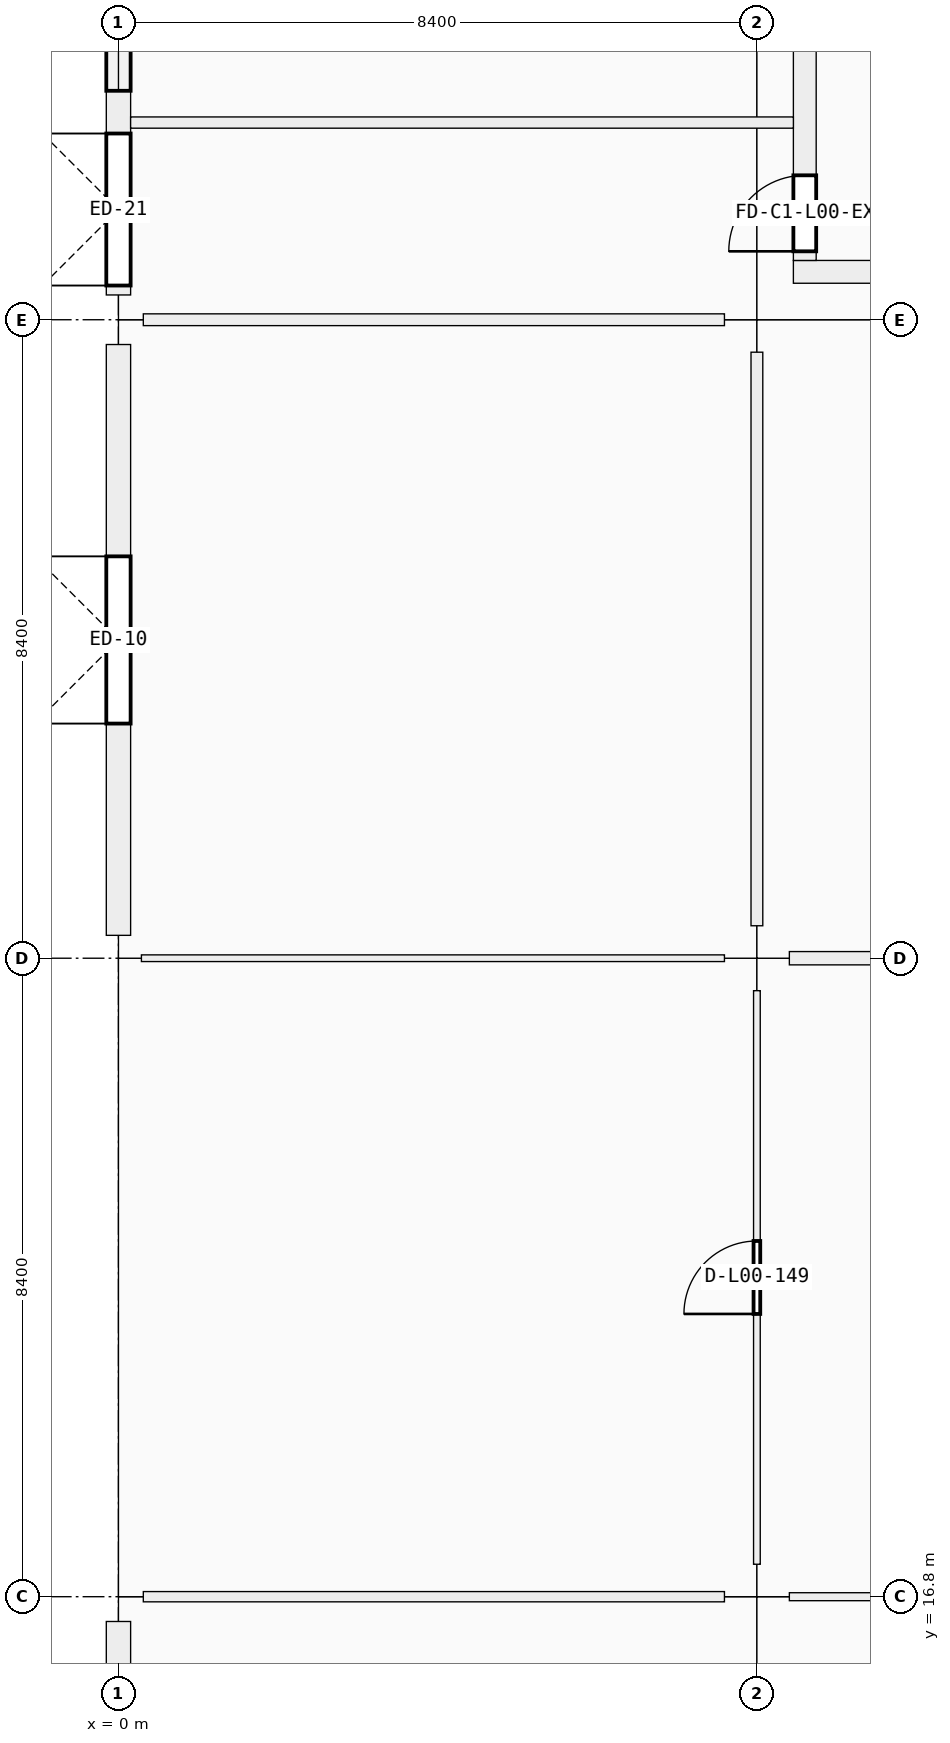
"""IFC4 building model, lengths in metres.
Left out: names, types, materials, properties, quantities, classifications, styles, units other than length and angle.
Written with IfcOpenShell. Run it as: python <this file> out.ifc"""

import sys

from ifc_helpers import new_model, si_unit, direction, frame, frame_2d, origin, origin_2d, place, context, subcontext, project, spatial, rectangle, extrude, element, fill, save


model = new_model("IFC4")
c1 = context("Model", 3, precision=1e-05, world=origin(), true_north=direction((0.0, 1.0)))
c2 = subcontext(c1, "Body", "Model", "MODEL_VIEW")
j1 = project(units=[si_unit("LENGTHUNIT", "METRE"), si_unit("PLANEANGLEUNIT", "RADIAN")], contexts=[c1])
p1 = place(None, origin())
s1 = spatial("IfcSite", under=j1, at=p1, CompositionType="ELEMENT")
p2 = place(p1, origin())
s2 = spatial("IfcBuilding", under=s1, at=p2, CompositionType="ELEMENT")
p3 = place(p2, origin())
s3 = spatial("IfcBuildingStorey", under=s2, at=p3, CompositionType="ELEMENT", Elevation=0.0)
p4 = place(p3, frame((0.0, 16.8, 0.0), z_axis=(0.0, 0.0, 1.0), x_axis=(1.0, 0.0, 0.0)))
e1 = element("IfcColumn", 1, at=p4, inside=s3, PredefinedType="COLUMN", context=c2, shape_type="SweptSolid", body=[
    extrude(rectangle(XDim=0.65, YDim=0.65, at=origin_2d()), origin(), (0.0, 0.0, 1.0), 5.76),
])
p5 = place(p3, frame((0.0, 25.2, 0.0), z_axis=(0.0, 0.0, 1.0), x_axis=(1.0, 0.0, 0.0)))
e2 = element("IfcColumn", 2, at=p5, inside=s3, PredefinedType="COLUMN", context=c2, shape_type="SweptSolid", body=[
    extrude(rectangle(XDim=0.6, YDim=0.6, at=origin_2d()), origin(), (0.0, 0.0, 1.0), 5.76),
])
p6 = place(p3, frame((0.0, 33.6, 0.0), z_axis=(0.0, 0.0, 1.0), x_axis=(1.0, 0.0, 0.0)))
e3 = element("IfcColumn", 3, at=p6, inside=s3, PredefinedType="COLUMN", context=c2, shape_type="SweptSolid", body=[
    extrude(rectangle(XDim=0.65, YDim=0.65, at=origin_2d()), origin(), (0.0, 0.0, 1.0), 5.76),
])
for number, where, z_axis, x_axis in (
    (4, (8.4, 16.8, 0.0), (0.0, 0.0, 1.0), (1.0, 0.0, 0.0)),
    (5, (8.4, 25.2, 0.0), (0.0, 0.0, 1.0), (1.0, 0.0, 0.0)),
    (6, (8.4, 33.6, 0.0), (0.0, 0.0, 1.0), (1.0, 0.0, 0.0)),
):
    element("IfcColumn", number, at=place(p3, frame(where, z_axis=z_axis, x_axis=x_axis)), inside=s3, PredefinedType="COLUMN", context=c2, shape_type="SweptSolid", body=[
        extrude(rectangle(XDim=0.85, YDim=0.85, at=origin_2d()), origin(), (0.0, 0.0, 1.0), 5.76),
    ])
p7 = place(p3, frame((0.0, 8.701, 0.0), z_axis=(0.0, 0.0, 1.0), x_axis=(0.0, 1.0, 0.0)))
e7 = element("IfcWall", 7, at=p7, inside=s3, PredefinedType="SOLIDWALL", context=c2, shape_type="SweptSolid", body=[
    extrude(rectangle(XDim=7.773, YDim=0.32, at=frame_2d((3.887, 0.0))), origin(), (0.0, 0.0, 1.0), 4.7),
])
p8 = place(p7, frame((2.837, 0.0, 0.9)))
e8 = element("IfcOpeningElement", 8, at=p8, cuts=e7, PredefinedType="OPENING", context=c2, shape_type="SweptSolid", body=[
    extrude(rectangle(XDim=2.1, YDim=1.8, at=frame_2d((1.05, 0.9))), frame((0.0, 0.16, 0.0), z_axis=(0.0, -1.0, 0.0), x_axis=(1.0, 0.0, 0.0)), (0.0, 0.0, 1.0), 0.32),
])
p9 = place(p3, frame((0.0, 25.501, 0.0), z_axis=(0.0, 0.0, 1.0), x_axis=(0.0, 1.0, 0.0)))
e9 = element("IfcWall", 9, at=p9, inside=s3, PredefinedType="SOLIDWALL", context=c2, shape_type="SweptSolid", body=[
    extrude(rectangle(XDim=7.773, YDim=0.32, at=frame_2d((3.886, 0.0))), origin(), (0.0, 0.0, 1.0), 4.7),
])
p10 = place(p9, frame((2.786, 0.0, 0.0)))
e10 = element("IfcOpeningElement", 10, at=p10, cuts=e9, PredefinedType="OPENING", context=c2, shape_type="SweptSolid", body=[
    extrude(rectangle(XDim=2.2, YDim=2.3, at=frame_2d((1.1, 1.15))), frame((0.0, 0.16, 0.0), z_axis=(0.0, -1.0, 0.0), x_axis=(1.0, 0.0, 0.0)), (0.0, 0.0, 1.0), 0.32),
])
p11 = place(p3, frame((0.0, 33.926, 0.0), z_axis=(0.0, 0.0, 1.0), x_axis=(0.0, 1.0, 0.0)))
e11 = element("IfcWall", 11, at=p11, inside=s3, PredefinedType="SOLIDWALL", context=c2, shape_type="SweptSolid", body=[
    extrude(rectangle(XDim=7.773, YDim=0.32, at=frame_2d((3.886, 0.0))), origin(), (0.0, 0.0, 1.0), 4.7),
])
p12 = place(p11, frame((2.686, 0.0, 0.9)))
e12 = element("IfcOpeningElement", 12, at=p12, cuts=e11, PredefinedType="OPENING", context=c2, shape_type="SweptSolid", body=[
    extrude(rectangle(XDim=2.4, YDim=1.8, at=frame_2d((1.2, 0.9))), frame((0.0, 0.16, 0.0), z_axis=(0.0, -1.0, 0.0), x_axis=(1.0, 0.0, 0.0)), (0.0, 0.0, 1.0), 0.32),
])
p13 = place(p11, frame((0.124, 0.0, 0.0)))
e13 = element("IfcOpeningElement", 13, at=p13, cuts=e11, PredefinedType="OPENING", context=c2, shape_type="SweptSolid", body=[
    extrude(rectangle(XDim=2.0, YDim=2.25, at=frame_2d((1.0, 1.125))), frame((0.0, 0.16, 0.0), z_axis=(0.0, -1.0, 0.0), x_axis=(1.0, 0.0, 0.0)), (0.0, 0.0, 1.0), 0.32),
])
p14 = place(p3, frame((16.32, 34.23, 0.0), z_axis=(0.0, 0.0, 1.0), x_axis=(-1.0, 0.0, 0.0)))
e14 = element("IfcWall", 14, at=p14, inside=s3, PredefinedType="SHEAR", context=c2, shape_type="SweptSolid", body=[
    extrude(rectangle(XDim=7.44, YDim=0.3, at=frame_2d((3.72, 0.0))), origin(), (0.0, 0.0, 1.0), 5.76),
])
p15 = place(p14, frame((1.28, 0.0, 0.0)))
e15 = element("IfcOpeningElement", 15, at=p15, cuts=e14, PredefinedType="OPENING", context=c2, shape_type="SweptSolid", body=[
    extrude(rectangle(XDim=1.5, YDim=2.15, at=frame_2d((0.75, 1.075))), frame((0.0, 0.15, 0.0), z_axis=(0.0, -1.0, 0.0), x_axis=(1.0, 0.0, 0.0)), (0.0, 0.0, 1.0), 0.3),
])
p16 = place(p3, frame((9.03, 34.38, 0.0), z_axis=(0.0, 0.0, 1.0), x_axis=(0.0, 1.0, 0.0)))
e16 = element("IfcWall", 16, at=p16, inside=s3, PredefinedType="SHEAR", context=c2, shape_type="SweptSolid", body=[
    extrude(rectangle(XDim=6.84, YDim=0.3, at=frame_2d((3.42, 0.0))), origin(), (0.0, 0.0, 1.0), 5.76),
])
p17 = place(p16, frame((0.12, 0.0, 0.0)))
e17 = element("IfcOpeningElement", 17, at=p17, cuts=e16, PredefinedType="OPENING", context=c2, shape_type="SweptSolid", body=[
    extrude(rectangle(XDim=1.0, YDim=2.15, at=frame_2d((0.5, 1.075))), frame((0.0, 0.15, 0.0), z_axis=(0.0, -1.0, 0.0), x_axis=(1.0, 0.0, 0.0)), (0.0, 0.0, 1.0), 0.3),
])
p18 = place(p3, frame((0.327, 16.8, 0.0), z_axis=(0.0, 0.0, 1.0), x_axis=(1.0, 0.0, 0.0)))
e18 = element("IfcWall", 18, at=p18, inside=s3, PredefinedType="PARTITIONING", context=c2, shape_type="SweptSolid", body=[
    extrude(rectangle(XDim=7.646, YDim=0.135, at=frame_2d((3.823, 0.0))), origin(), (0.0, 0.0, 1.0), 3.66),
])
p19 = place(p18, frame((3.358, 0.0, 0.0)))
e19 = element("IfcOpeningElement", 19, at=p19, cuts=e18, PredefinedType="OPENING", context=c2, shape_type="SweptSolid", body=[
    extrude(rectangle(XDim=0.93, YDim=2.12, at=frame_2d((0.465, 1.06))), frame((0.0, 0.067, 0.0), z_axis=(0.0, -1.0, 0.0), x_axis=(1.0, 0.0, 0.0)), (0.0, 0.0, 1.0), 0.135),
])
p20 = place(p3, frame((0.302, 25.2, 0.0), z_axis=(0.0, 0.0, 1.0), x_axis=(1.0, 0.0, 0.0)))
e20 = element("IfcWall", 20, at=p20, inside=s3, PredefinedType="PARTITIONING", context=c2, shape_type="SweptSolid", body=[
    extrude(rectangle(XDim=7.671, YDim=0.088, at=frame_2d((3.835, 0.0))), origin(), (0.0, 0.0, 1.0), 3.66),
])
p21 = place(p20, frame((3.311, 0.0, 0.0)))
e21 = element("IfcOpeningElement", 21, at=p21, cuts=e20, PredefinedType="OPENING", context=c2, shape_type="SweptSolid", body=[
    extrude(rectangle(XDim=1.05, YDim=2.12, at=frame_2d((0.525, 1.06))), frame((0.0, 0.044, 0.0), z_axis=(0.0, -1.0, 0.0), x_axis=(1.0, 0.0, 0.0)), (0.0, 0.0, 1.0), 0.088),
])
p22 = place(p3, frame((0.327, 33.6, 0.0), z_axis=(0.0, 0.0, 1.0), x_axis=(1.0, 0.0, 0.0)))
e22 = element("IfcWall", 22, at=p22, inside=s3, PredefinedType="PARTITIONING", context=c2, shape_type="SweptSolid", body=[
    extrude(rectangle(XDim=7.646, YDim=0.155, at=frame_2d((3.823, 0.0))), origin(), (0.0, 0.0, 1.0), 3.66),
])
p23 = place(p22, frame((3.283, 0.0, 0.0)))
e23 = element("IfcOpeningElement", 23, at=p23, cuts=e22, PredefinedType="OPENING", context=c2, shape_type="SweptSolid", body=[
    extrude(rectangle(XDim=1.08, YDim=2.25, at=frame_2d((0.54, 1.125))), frame((0.0, 0.078, 0.0), z_axis=(0.0, -1.0, 0.0), x_axis=(1.0, 0.0, 0.0)), (0.0, 0.0, 1.0), 0.155),
])
p24 = place(p3, frame((8.827, 16.8, 0.0), z_axis=(0.0, 0.0, 1.0), x_axis=(1.0, 0.0, 0.0)))
e24 = element("IfcWall", 24, at=p24, inside=s3, PredefinedType="PARTITIONING", context=c2, shape_type="SweptSolid", body=[
    extrude(rectangle(XDim=7.546, YDim=0.105, at=frame_2d((3.773, 0.0))), origin(), (0.0, 0.0, 1.0), 3.66),
])
p25 = place(p24, frame((3.273, 0.0, 0.0)))
e25 = element("IfcOpeningElement", 25, at=p25, cuts=e24, PredefinedType="OPENING", context=c2, shape_type="SweptSolid", body=[
    extrude(rectangle(XDim=1.0, YDim=2.2, at=frame_2d((0.5, 1.1))), frame((0.0, 0.052, 0.0), z_axis=(0.0, -1.0, 0.0), x_axis=(1.0, 0.0, 0.0)), (0.0, 0.0, 1.0), 0.105),
])
p26 = place(p3, frame((8.827, 25.2, 0.0), z_axis=(0.0, 0.0, 1.0), x_axis=(1.0, 0.0, 0.0)))
e26 = element("IfcWall", 26, at=p26, inside=s3, PredefinedType="PARTITIONING", context=c2, shape_type="SweptSolid", body=[
    extrude(rectangle(XDim=7.546, YDim=0.175, at=frame_2d((3.773, 0.0))), origin(), (0.0, 0.0, 1.0), 3.66),
])
p27 = place(p26, frame((3.253, 0.0, 0.0)))
e27 = element("IfcOpeningElement", 27, at=p27, cuts=e26, PredefinedType="OPENING", context=c2, shape_type="SweptSolid", body=[
    extrude(rectangle(XDim=1.04, YDim=2.2, at=frame_2d((0.52, 1.1))), frame((0.0, 0.087, 0.0), z_axis=(0.0, -1.0, 0.0), x_axis=(1.0, 0.0, 0.0)), (0.0, 0.0, 1.0), 0.175),
])
p28 = place(p3, frame((8.4, 17.227, 0.0), z_axis=(0.0, 0.0, 1.0), x_axis=(0.0, 1.0, 0.0)))
e28 = element("IfcWall", 28, at=p28, inside=s3, PredefinedType="PARTITIONING", context=c2, shape_type="SweptSolid", body=[
    extrude(rectangle(XDim=7.546, YDim=0.088, at=frame_2d((3.773, 0.0))), origin(), (0.0, 0.0, 1.0), 3.66),
])
p29 = place(p28, frame((3.293, 0.0, 0.0)))
e29 = element("IfcOpeningElement", 29, at=p29, cuts=e28, PredefinedType="OPENING", context=c2, shape_type="SweptSolid", body=[
    extrude(rectangle(XDim=0.96, YDim=2.18, at=frame_2d((0.48, 1.09))), frame((0.0, 0.044, 0.0), z_axis=(0.0, -1.0, 0.0), x_axis=(1.0, 0.0, 0.0)), (0.0, 0.0, 1.0), 0.088),
])
p30 = place(p3, frame((8.4, 25.627, 0.0), z_axis=(0.0, 0.0, 1.0), x_axis=(0.0, 1.0, 0.0)))
e30 = element("IfcWall", 30, at=p30, inside=s3, PredefinedType="PARTITIONING", context=c2, shape_type="SweptSolid", body=[
    extrude(rectangle(XDim=7.546, YDim=0.155, at=frame_2d((3.773, 0.0))), origin(), (0.0, 0.0, 1.0), 3.66),
])
p31 = place(p30, frame((3.253, 0.0, 0.0)))
e31 = element("IfcOpeningElement", 31, at=p31, cuts=e30, PredefinedType="OPENING", context=c2, shape_type="SweptSolid", body=[
    extrude(rectangle(XDim=1.04, YDim=2.2, at=frame_2d((0.52, 1.1))), frame((0.0, 0.078, 0.0), z_axis=(0.0, -1.0, 0.0), x_axis=(1.0, 0.0, 0.0)), (0.0, 0.0, 1.0), 0.155),
])
p32 = place(p3, frame((0.16, 36.194, 0.0), z_axis=(0.0, 0.0, 1.0), x_axis=(1.0, 0.0, 0.0)))
e32 = element("IfcWall", 32, at=p32, inside=s3, PredefinedType="PARTITIONING", context=c2, shape_type="SweptSolid", body=[
    extrude(rectangle(XDim=8.72, YDim=0.148, at=frame_2d((4.36, 0.0))), origin(), (0.0, 0.0, 1.0), 3.66),
])
p33 = place(p10, origin())
e33 = element("IfcDoor", 33, at=p33, inside=s3, OperationType="DOUBLE_DOOR_SINGLE_SWING", PredefinedType="DOOR", context=c2, shape_type="SweptSolid", body=[
    extrude(rectangle(XDim=2.2, YDim=2.3, at=frame_2d((1.1, 1.15))), frame((0.0, 0.025, 0.0), z_axis=(0.0, -1.0, 0.0), x_axis=(1.0, 0.0, 0.0)), (0.0, 0.0, 1.0), 0.05),
])
fill(e10, e33)
p34 = place(p12, origin())
e34 = element("IfcWindow", 34, at=p34, inside=s3, PartitioningType="SINGLE_PANEL", PredefinedType="WINDOW", context=c2, shape_type="SweptSolid", body=[
    extrude(rectangle(XDim=2.4, YDim=1.8, at=frame_2d((1.2, 0.9))), frame((0.0, 0.03, 0.0), z_axis=(0.0, -1.0, 0.0), x_axis=(1.0, 0.0, 0.0)), (0.0, 0.0, 1.0), 0.06),
])
fill(e12, e34)
p35 = place(p13, origin())
e35 = element("IfcDoor", 35, at=p35, inside=s3, OperationType="DOUBLE_DOOR_SINGLE_SWING", PredefinedType="DOOR", context=c2, shape_type="SweptSolid", body=[
    extrude(rectangle(XDim=2.0, YDim=2.25, at=frame_2d((1.0, 1.125))), frame((0.0, 0.025, 0.0), z_axis=(0.0, -1.0, 0.0), x_axis=(1.0, 0.0, 0.0)), (0.0, 0.0, 1.0), 0.05),
])
fill(e13, e35)
p36 = place(p17, origin())
e36 = element("IfcDoor", 36, at=p36, inside=s3, OperationType="SINGLE_SWING_LEFT", PredefinedType="DOOR", context=c2, shape_type="SweptSolid", body=[
    extrude(rectangle(XDim=1.0, YDim=2.15, at=frame_2d((0.5, 1.075))), frame((0.0, 0.025, 0.0), z_axis=(0.0, -1.0, 0.0), x_axis=(1.0, 0.0, 0.0)), (0.0, 0.0, 1.0), 0.05),
])
fill(e17, e36)
p37 = place(p31, origin())
e37 = element("IfcDoor", 37, at=p37, inside=s3, OperationType="SINGLE_SWING_RIGHT", PredefinedType="DOOR", context=c2, shape_type="SweptSolid", body=[
    extrude(rectangle(XDim=1.04, YDim=2.2, at=frame_2d((0.52, 1.1))), frame((0.0, 0.025, 0.0), z_axis=(0.0, -1.0, 0.0), x_axis=(1.0, 0.0, 0.0)), (0.0, 0.0, 1.0), 0.05),
])
fill(e31, e37)
p38 = place(p19, origin())
e38 = element("IfcDoor", 38, at=p38, inside=s3, OperationType="SINGLE_SWING_LEFT", PredefinedType="DOOR", context=c2, shape_type="SweptSolid", body=[
    extrude(rectangle(XDim=0.93, YDim=2.12, at=frame_2d((0.465, 1.06))), frame((0.0, 0.025, 0.0), z_axis=(0.0, -1.0, 0.0), x_axis=(1.0, 0.0, 0.0)), (0.0, 0.0, 1.0), 0.05),
])
fill(e19, e38)
p39 = place(p23, origin())
e39 = element("IfcDoor", 39, at=p39, inside=s3, OperationType="SINGLE_SWING_RIGHT", PredefinedType="DOOR", context=c2, shape_type="SweptSolid", body=[
    extrude(rectangle(XDim=1.08, YDim=2.25, at=frame_2d((0.54, 1.125))), frame((0.0, 0.025, 0.0), z_axis=(0.0, -1.0, 0.0), x_axis=(1.0, 0.0, 0.0)), (0.0, 0.0, 1.0), 0.05),
])
fill(e23, e39)
p40 = place(p21, origin())
e40 = element("IfcDoor", 40, at=p40, inside=s3, OperationType="SINGLE_SWING_LEFT", PredefinedType="DOOR", context=c2, shape_type="SweptSolid", body=[
    extrude(rectangle(XDim=1.05, YDim=2.12, at=frame_2d((0.525, 1.06))), frame((0.0, 0.025, 0.0), z_axis=(0.0, -1.0, 0.0), x_axis=(1.0, 0.0, 0.0)), (0.0, 0.0, 1.0), 0.05),
])
fill(e21, e40)
p41 = place(p29, origin())
e41 = element("IfcDoor", 41, at=p41, inside=s3, OperationType="SINGLE_SWING_LEFT", PredefinedType="DOOR", context=c2, shape_type="SweptSolid", body=[
    extrude(rectangle(XDim=0.96, YDim=2.18, at=frame_2d((0.48, 1.09))), frame((0.0, 0.025, 0.0), z_axis=(0.0, -1.0, 0.0), x_axis=(1.0, 0.0, 0.0)), (0.0, 0.0, 1.0), 0.05),
])
fill(e29, e41)
save(model, sys.argv[1])
